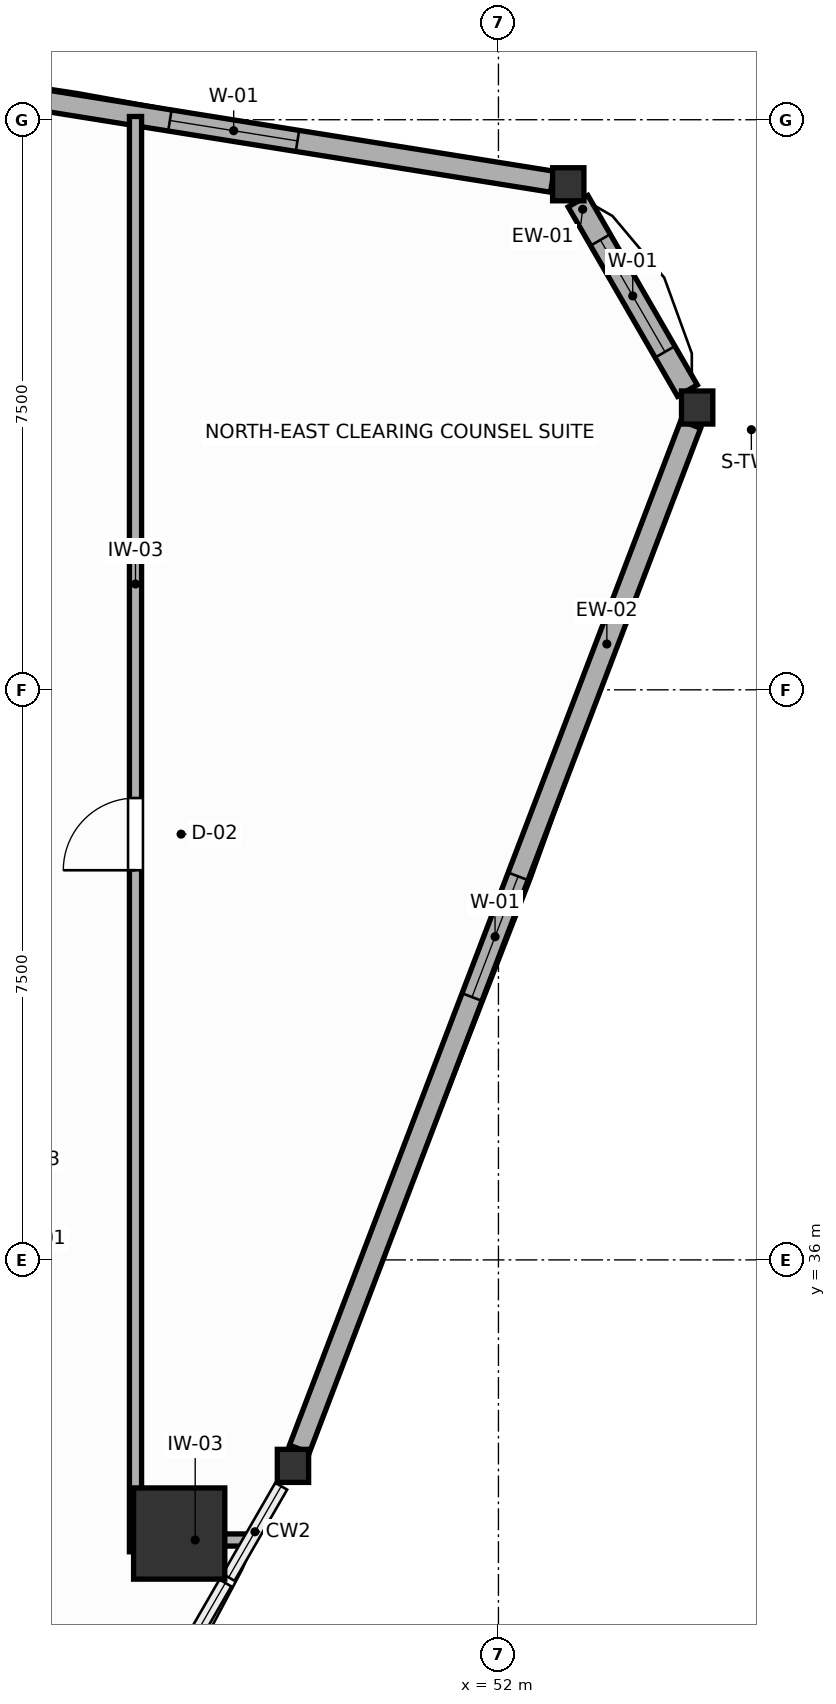
"""IFC4 building model, lengths in metres.
Left out: names, types, materials, properties, quantities, classifications, styles, units other than length and angle.
Written with IfcOpenShell. Run it as: python <this file> out.ifc"""

import sys

from ifc_helpers import new_model, si_unit, direction, frame, frame_2d, origin, origin_2d, place, context, subcontext, project, spatial, rectangle, i_section, extrude, source, transform, mapped, element, fill, save


model = new_model("IFC4")
c1 = context("Model", 3, precision=1e-05, world=origin(), true_north=direction((0.0, 1.0)))
c2 = subcontext(c1, "Body", "Model", "MODEL_VIEW")
j1 = project(units=[si_unit("LENGTHUNIT", "METRE"), si_unit("PLANEANGLEUNIT", "RADIAN")], contexts=[c1])
p1 = place(None, origin())
s1 = spatial("IfcSite", under=j1, at=p1, CompositionType="ELEMENT")
p2 = place(p1, origin())
s2 = spatial("IfcBuilding", under=s1, at=p2, CompositionType="ELEMENT")
p3 = place(p2, frame((0.0, 0.0, 161.4)))
s3 = spatial("IfcBuildingStorey", under=s2, at=p3, CompositionType="ELEMENT", Elevation=161.4)
m1 = source(origin(), c2, "Body", "SweptSolid", [
    extrude(rectangle(XDim=1.2, YDim=1.2, at=origin_2d()), origin(), (0.0, 0.0, 1.0), 3.6),
])
p4 = place(p3, frame((47.8, 32.4, 0.0), z_axis=(0.0, 0.0, 1.0), x_axis=(1.0, 0.0, 0.0)))
e1 = element("IfcColumn", 1, at=p4, inside=s3, PredefinedType="COLUMN", context=c2, shape_type="MappedRepresentation", body=[
    mapped(m1, transform((0.0, 0.0, 0.0), scale=1.0)),
])
m2 = source(origin(), c2, "Body", "SweptSolid", [
    extrude(i_section(OverallWidth=0.412, OverallDepth=0.435, WebThickness=0.033, FlangeThickness=0.053, FilletRadius=0.015, at=origin_2d()), origin(), (0.0, 0.0, 1.0), 3.6),
])
for number, where, z_axis, x_axis in (
    (2, (54.614, 47.214, 0.0), (0.0, 0.0, 1.0), (1.0, 0.0, 0.0)),
    (3, (52.919, 50.151, 0.0), (0.0, 0.0, 1.0), (1.0, 0.0, 0.0)),
    (4, (49.297, 33.29, 0.0), (0.0, 0.0, 1.0), (1.0, 0.0, 0.0)),
):
    element("IfcColumn", number, at=place(p3, frame(where, z_axis=z_axis, x_axis=x_axis)), inside=s3, PredefinedType="COLUMN", context=c2, shape_type="MappedRepresentation", body=[
        mapped(m2, transform((0.0, 0.0, 0.0), scale=1.0)),
    ])
p5 = place(p3, frame((54.486, 47.436, 0.0), z_axis=(0.0, 0.0, 1.0), x_axis=(-0.499962359318, 0.866047134552, 0.0)))
e5 = element("IfcWall", 5, at=p5, inside=s3, PredefinedType="SOLIDWALL", context=c2, shape_type="SweptSolid", body=[
    extrude(rectangle(XDim=2.878, YDim=0.3, at=frame_2d((1.439, 0.0))), origin(), (0.0, 0.0, 1.0), 3.0),
])
p6 = place(p5, frame((0.589, 0.0, 0.75)))
e6 = element("IfcOpeningElement", 6, at=p6, cuts=e5, PredefinedType="OPENING", context=c2, shape_type="SweptSolid", body=[
    extrude(rectangle(XDim=1.7, YDim=1.75, at=frame_2d((0.85, 0.875))), frame((0.0, 0.16, 0.0), z_axis=(0.0, -1.0, 0.0), x_axis=(1.0, 0.0, 0.0)), (0.0, 0.0, 1.0), 0.32),
])
p7 = place(p3, frame((52.708, 50.185, 0.0), z_axis=(0.0, 0.0, 1.0), x_axis=(-0.98742305143, 0.158100339991, 0.0)))
e7 = element("IfcWall", 7, at=p7, inside=s3, PredefinedType="SOLIDWALL", context=c2, shape_type="SweptSolid", body=[
    extrude(rectangle(XDim=14.477, YDim=0.28, at=frame_2d((7.239, 0.0))), origin(), (0.0, 0.0, 1.0), 3.0),
])
p8 = place(p7, frame((3.394, 0.0, 0.75)))
e8 = element("IfcOpeningElement", 8, at=p8, cuts=e7, PredefinedType="OPENING", context=c2, shape_type="SweptSolid", body=[
    extrude(rectangle(XDim=1.7, YDim=1.75, at=frame_2d((0.85, 0.875))), frame((0.0, 0.15, 0.0), z_axis=(0.0, -1.0, 0.0), x_axis=(1.0, 0.0, 0.0)), (0.0, 0.0, 1.0), 0.3),
])
p9 = place(p3, frame((49.382, 33.513, 0.0), z_axis=(0.0, 0.0, 1.0), x_axis=(0.356778358033, 0.934189061828, 0.0)))
e9 = element("IfcWall", 9, at=p9, inside=s3, PredefinedType="SOLIDWALL", context=c2, shape_type="SweptSolid", body=[
    extrude(rectangle(XDim=14.428, YDim=0.28, at=frame_2d((7.214, 0.0))), origin(), (0.0, 0.0, 1.0), 3.0),
])
p10 = place(p9, frame((6.364, 0.0, 0.75)))
e10 = element("IfcOpeningElement", 10, at=p10, cuts=e9, PredefinedType="OPENING", context=c2, shape_type="SweptSolid", body=[
    extrude(rectangle(XDim=1.7, YDim=1.75, at=frame_2d((0.85, 0.875))), frame((0.0, 0.15, 0.0), z_axis=(0.0, -1.0, 0.0), x_axis=(1.0, 0.0, 0.0)), (0.0, 0.0, 1.0), 0.3),
])
p11 = place(p3, frame((47.225, 32.16, 0.0), z_axis=(0.0, 0.0, 1.0), x_axis=(0.0, 1.0, 0.0)))
e11 = element("IfcWall", 11, at=p11, inside=s3, PredefinedType="PARTITIONING", context=c2, shape_type="SweptSolid", body=[
    extrude(rectangle(XDim=18.883, YDim=0.16, at=frame_2d((9.441, 0.0))), origin(), (0.0, 0.0, 1.0), 3.4),
])
p12 = place(p11, frame((8.966, 0.0, 0.0)))
e12 = element("IfcOpeningElement", 12, at=p12, cuts=e11, PredefinedType="OPENING", context=c2, shape_type="SweptSolid", body=[
    extrude(rectangle(XDim=0.95, YDim=2.05, at=frame_2d((0.475, 1.025))), frame((0.0, 0.09, 0.0), z_axis=(0.0, -1.0, 0.0), x_axis=(1.0, 0.0, 0.0)), (0.0, 0.0, 1.0), 0.18),
])
p13 = place(p3, frame((47.307, 32.315, 0.0), z_axis=(0.0, 0.0, 1.0), x_axis=(1.0, 0.0, 0.0)))
e13 = element("IfcWall", 13, at=p13, inside=s3, PredefinedType="PARTITIONING", context=c2, shape_type="SweptSolid", body=[
    extrude(rectangle(XDim=1.407, YDim=0.16, at=frame_2d((0.703, 0.0))), origin(), (0.0, 0.0, 1.0), 2.95),
])
p14 = place(p6, origin())
e14 = element("IfcWindow", 14, at=p14, inside=s3, PartitioningType="SINGLE_PANEL", PredefinedType="WINDOW", context=c2, shape_type="SweptSolid", body=[
    extrude(rectangle(XDim=1.7, YDim=1.75, at=frame_2d((0.85, 0.875))), frame((0.0, 0.03, 0.0), z_axis=(0.0, -1.0, 0.0), x_axis=(1.0, 0.0, 0.0)), (0.0, 0.0, 1.0), 0.06),
])
fill(e6, e14)
p15 = place(p8, origin())
e15 = element("IfcWindow", 15, at=p15, inside=s3, PartitioningType="SINGLE_PANEL", PredefinedType="WINDOW", context=c2, shape_type="SweptSolid", body=[
    extrude(rectangle(XDim=1.7, YDim=1.75, at=frame_2d((0.85, 0.875))), frame((0.0, 0.03, 0.0), z_axis=(0.0, -1.0, 0.0), x_axis=(1.0, 0.0, 0.0)), (0.0, 0.0, 1.0), 0.06),
])
fill(e8, e15)
p16 = place(p10, origin())
e16 = element("IfcWindow", 16, at=p16, inside=s3, PartitioningType="SINGLE_PANEL", PredefinedType="WINDOW", context=c2, shape_type="SweptSolid", body=[
    extrude(rectangle(XDim=1.7, YDim=1.75, at=frame_2d((0.85, 0.875))), frame((0.0, 0.03, 0.0), z_axis=(0.0, -1.0, 0.0), x_axis=(1.0, 0.0, 0.0)), (0.0, 0.0, 1.0), 0.06),
])
fill(e10, e16)
p17 = place(p12, origin())
e17 = element("IfcDoor", 17, at=p17, inside=s3, OperationType="SINGLE_SWING_LEFT", PredefinedType="DOOR", context=c2, shape_type="SweptSolid", body=[
    extrude(rectangle(XDim=0.95, YDim=2.05, at=frame_2d((0.475, 1.025))), frame((0.0, 0.025, 0.0), z_axis=(0.0, -1.0, 0.0), x_axis=(1.0, 0.0, 0.0)), (0.0, 0.0, 1.0), 0.05),
])
fill(e12, e17)
save(model, sys.argv[1])
